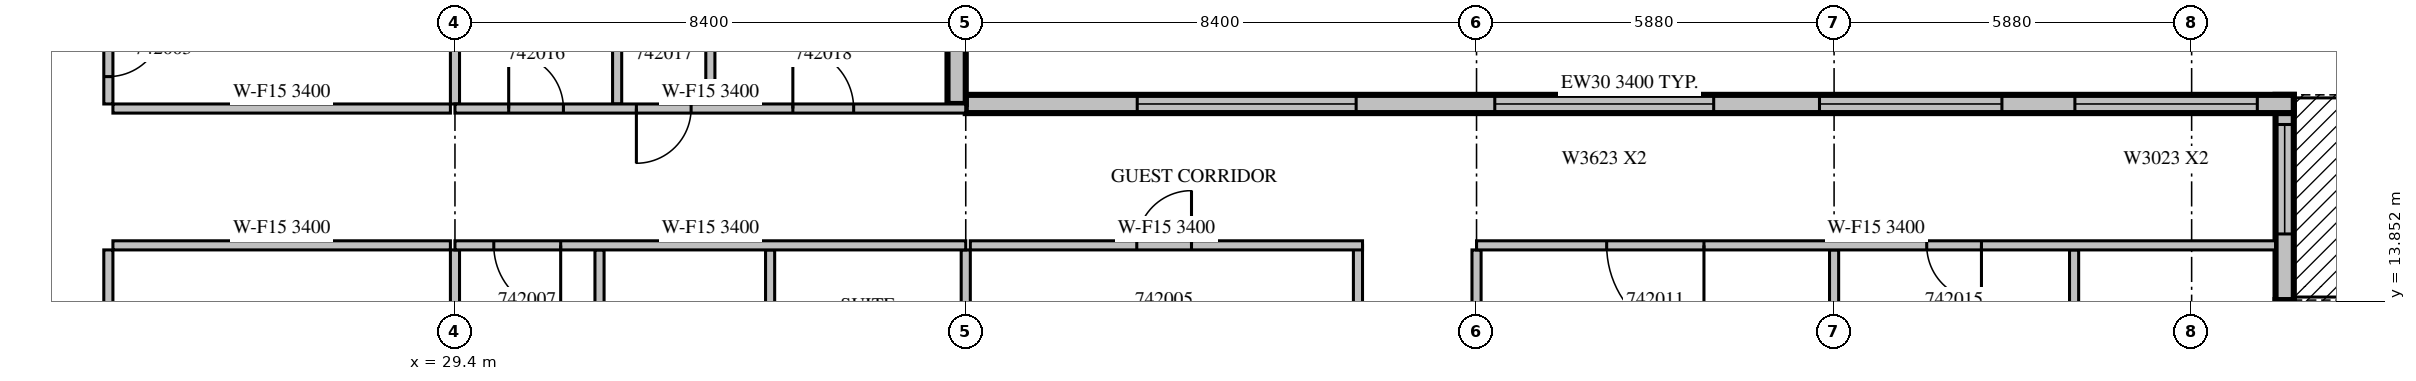
"""IFC4 building model, lengths in metres.
Left out: names, types, materials, properties, quantities, classifications, styles, units other than length and angle.
Written with IfcOpenShell. Run it as: python <this file> out.ifc"""

import sys

from ifc_helpers import new_model, si_unit, direction, frame, frame_2d, origin, place, context, subcontext, project, spatial, rectangle, extrude, source, transform, mapped, element, fill, save


model = new_model("IFC4")
c1 = context("Model", 3, precision=1e-05, world=origin(), true_north=direction((0.0, 1.0)))
c2 = subcontext(c1, "Body", "Model", "MODEL_VIEW")
j1 = project(units=[si_unit("LENGTHUNIT", "METRE"), si_unit("PLANEANGLEUNIT", "RADIAN")], contexts=[c1])
p1 = place(None, origin())
s1 = spatial("IfcSite", under=j1, at=p1, CompositionType="ELEMENT")
p2 = place(p1, origin())
s2 = spatial("IfcBuilding", under=s1, at=p2, CompositionType="ELEMENT")
p3 = place(p2, frame((0.0, 0.0, 193.0)))
s3 = spatial("IfcBuildingStorey", under=s2, at=p3, CompositionType="ELEMENT", Elevation=193.0)
m1 = source(origin(), c2, "Body", "SweptSolid", [
    extrude(rectangle(XDim=3.375, YDim=0.3, at=frame_2d((1.688, 0.0))), origin(), (0.0, 0.0, 1.0), 3.4),
])
p4 = place(p3, frame((59.49, 10.5, 0.0), z_axis=(0.0, 0.0, 1.0), x_axis=(0.0, 1.0, 0.0)))
e1 = element("IfcWall", 1, at=p4, inside=s3, PredefinedType="STANDARD", context=c2, shape_type="MappedRepresentation", body=[
    mapped(m1, transform((0.0, 0.0, 0.0), scale=1.0)),
])
m2 = source(origin(), c2, "Body", "SweptSolid", [
    extrude(rectangle(XDim=1.2, YDim=2.3, at=frame_2d((0.6, 1.15))), frame((0.0, 0.16, 0.0), z_axis=(0.0, -1.0, 0.0), x_axis=(1.0, 0.0, 0.0)), (0.0, 0.0, 1.0), 0.32),
])
p5 = place(p4, frame((1.087, 0.0, 0.6)))
e2 = element("IfcOpeningElement", 2, at=p5, cuts=e1, PredefinedType="OPENING", context=c2, shape_type="MappedRepresentation", body=[
    mapped(m2, transform((0.0, 0.0, 0.0), scale=1.0)),
])
p6 = place(p3, frame((59.49, 13.875, 0.0), z_axis=(0.0, 0.0, 1.0), x_axis=(0.0, 1.0, 0.0)))
e3 = element("IfcWall", 3, at=p6, inside=s3, PredefinedType="STANDARD", context=c2, shape_type="MappedRepresentation", body=[
    mapped(m1, transform((0.0, 0.0, 0.0), scale=1.0)),
])
m3 = source(origin(), c2, "Body", "SweptSolid", [
    extrude(rectangle(XDim=1.8, YDim=2.4, at=frame_2d((0.9, 1.2))), frame((0.0, 0.16, 0.0), z_axis=(0.0, -1.0, 0.0), x_axis=(1.0, 0.0, 0.0)), (0.0, 0.0, 1.0), 0.32),
])
p7 = place(p6, frame((1.087, 0.0, 0.0)))
e4 = element("IfcOpeningElement", 4, at=p7, cuts=e3, PredefinedType="OPENING", context=c2, shape_type="MappedRepresentation", body=[
    mapped(m3, transform((0.0, 0.0, 0.0), scale=1.0)),
])
m4 = source(origin(), c2, "Body", "SweptSolid", [
    extrude(rectangle(XDim=21.84, YDim=0.3, at=frame_2d((10.92, 0.0))), origin(), (0.0, 0.0, 1.0), 3.4),
])
p8 = place(p3, frame((59.64, 17.1, 0.0), z_axis=(0.0, 0.0, 1.0), x_axis=(-1.0, 0.0, 0.0)))
e5 = element("IfcWall", 5, at=p8, inside=s3, PredefinedType="STANDARD", context=c2, shape_type="MappedRepresentation", body=[
    mapped(m4, transform((0.0, 0.0, 0.0), scale=1.0)),
])
m5 = source(origin(), c2, "Body", "SweptSolid", [
    extrude(rectangle(XDim=3.0, YDim=2.3, at=frame_2d((1.5, 1.15))), frame((0.0, 0.16, 0.0), z_axis=(0.0, -1.0, 0.0), x_axis=(1.0, 0.0, 0.0)), (0.0, 0.0, 1.0), 0.32),
])
p9 = place(p8, frame((0.6, 0.0, 0.6)))
e6 = element("IfcOpeningElement", 6, at=p9, cuts=e5, PredefinedType="OPENING", context=c2, shape_type="MappedRepresentation", body=[
    mapped(m5, transform((0.0, 0.0, 0.0), scale=1.0)),
])
p10 = place(p8, frame((4.8, 0.0, 0.6)))
e7 = element("IfcOpeningElement", 7, at=p10, cuts=e5, PredefinedType="OPENING", context=c2, shape_type="MappedRepresentation", body=[
    mapped(m5, transform((0.0, 0.0, 0.0), scale=1.0)),
])
m6 = source(origin(), c2, "Body", "SweptSolid", [
    extrude(rectangle(XDim=3.6, YDim=2.3, at=frame_2d((1.8, 1.15))), frame((0.0, 0.16, 0.0), z_axis=(0.0, -1.0, 0.0), x_axis=(1.0, 0.0, 0.0)), (0.0, 0.0, 1.0), 0.32),
])
p11 = place(p8, frame((9.54, 0.0, 0.6)))
e8 = element("IfcOpeningElement", 8, at=p11, cuts=e5, PredefinedType="OPENING", context=c2, shape_type="MappedRepresentation", body=[
    mapped(m6, transform((0.0, 0.0, 0.0), scale=1.0)),
])
p12 = place(p8, frame((15.42, 0.0, 0.6)))
e9 = element("IfcOpeningElement", 9, at=p12, cuts=e5, PredefinedType="OPENING", context=c2, shape_type="MappedRepresentation", body=[
    mapped(m6, transform((0.0, 0.0, 0.0), scale=1.0)),
])
m7 = source(origin(), c2, "Body", "SweptSolid", [
    extrude(rectangle(XDim=3.0, YDim=0.3, at=frame_2d((1.5, 0.0))), origin(), (0.0, 0.0, 1.0), 3.4),
])
p13 = place(p3, frame((37.65, 17.1, 0.0), z_axis=(0.0, 0.0, 1.0), x_axis=(0.0, 1.0, 0.0)))
e10 = element("IfcWall", 10, at=p13, inside=s3, PredefinedType="STANDARD", context=c2, shape_type="MappedRepresentation", body=[
    mapped(m7, transform((0.0, 0.0, 0.0), scale=1.0)),
])
p14 = place(p13, frame((1.425, 0.0, 0.6)))
e11 = element("IfcOpeningElement", 11, at=p14, cuts=e10, PredefinedType="OPENING", context=c2, shape_type="MappedRepresentation", body=[
    mapped(m2, transform((0.0, 0.0, 0.0), scale=1.0)),
])
p15 = place(p3, frame((23.7, 14.7, 0.0), z_axis=(0.0, 0.0, 1.0), x_axis=(0.0, -1.0, 0.0)))
e12 = element("IfcWall", 12, at=p15, inside=s3, PredefinedType="PARTITIONING", context=c2, shape_type="SweptSolid", body=[
    extrude(rectangle(XDim=11.225, YDim=0.15, at=frame_2d((5.612, 0.0))), origin(), (0.0, 0.0, 1.0), 2.4),
])
m8 = source(origin(), c2, "Body", "SweptSolid", [
    extrude(rectangle(XDim=0.9, YDim=2.1, at=frame_2d((0.45, 1.05))), frame((0.0, 0.085, 0.0), z_axis=(0.0, -1.0, 0.0), x_axis=(1.0, 0.0, 0.0)), (0.0, 0.0, 1.0), 0.17),
])
p16 = place(p15, frame((8.463, 0.0, 0.0)))
e13 = element("IfcOpeningElement", 13, at=p16, cuts=e12, PredefinedType="OPENING", context=c2, shape_type="MappedRepresentation", body=[
    mapped(m8, transform((0.0, 0.0, 0.0), scale=1.0)),
])
p17 = place(p15, frame((1.975, 0.0, 0.0)))
e14 = element("IfcOpeningElement", 14, at=p17, cuts=e12, PredefinedType="OPENING", context=c2, shape_type="MappedRepresentation", body=[
    mapped(m8, transform((0.0, 0.0, 0.0), scale=1.0)),
])
m9 = source(origin(), c2, "Body", "SweptSolid", [
    extrude(rectangle(XDim=3.6, YDim=0.15, at=frame_2d((1.8, 0.0))), origin(), (0.0, 0.0, 1.0), 3.4),
])
p18 = place(p3, frame((23.7, 20.7, 0.0), z_axis=(0.0, 0.0, 1.0), x_axis=(0.0, -1.0, 0.0)))
e15 = element("IfcWall", 15, at=p18, inside=s3, PredefinedType="PARTITIONING", context=c2, shape_type="MappedRepresentation", body=[
    mapped(m9, transform((0.0, 0.0, 0.0), scale=1.0)),
])
p19 = place(p18, frame((2.25, 0.0, 0.0)))
e16 = element("IfcOpeningElement", 16, at=p19, cuts=e15, PredefinedType="OPENING", context=c2, shape_type="MappedRepresentation", body=[
    mapped(m8, transform((0.0, 0.0, 0.0), scale=1.0)),
])
m10 = source(origin(), c2, "Body", "SweptSolid", [
    extrude(rectangle(XDim=5.55, YDim=0.15, at=frame_2d((2.775, 0.0))), origin(), (0.0, 0.0, 1.0), 3.4),
])
for number, where, z_axis, x_axis in (
    (17, (29.325, 14.775, 0.0), (0.0, 0.0, 1.0), (-1.0, 0.0, 0.0)),
    (18, (23.775, 17.025, 0.0), (0.0, 0.0, 1.0), (1.0, 0.0, 0.0)),
):
    element("IfcWall", number, at=place(p3, frame(where, z_axis=z_axis, x_axis=x_axis)), inside=s3, PredefinedType="PARTITIONING", context=c2, shape_type="MappedRepresentation", body=[
        mapped(m10, transform((0.0, 0.0, 0.0), scale=1.0)),
    ])
p20 = place(p3, frame((29.4, 10.949, 0.0), z_axis=(0.0, 0.0, 1.0), x_axis=(0.0, 1.0, 0.0)))
e19 = element("IfcWall", 19, at=p20, inside=s3, PredefinedType="PARTITIONING", context=c2, shape_type="SweptSolid", body=[
    extrude(rectangle(XDim=3.751, YDim=0.15, at=frame_2d((1.875, 0.0))), origin(), (0.0, 0.0, 1.0), 3.4),
])
m11 = source(origin(), c2, "Body", "SweptSolid", [
    extrude(rectangle(XDim=3.001, YDim=0.15, at=frame_2d((1.5, 0.0))), origin(), (0.0, 0.0, 1.0), 3.4),
])
p21 = place(p3, frame((29.4, 17.1, 0.0), z_axis=(0.0, 0.0, 1.0), x_axis=(0.0, 1.0, 0.0)))
e20 = element("IfcWall", 20, at=p21, inside=s3, PredefinedType="PARTITIONING", context=c2, shape_type="MappedRepresentation", body=[
    mapped(m11, transform((0.0, 0.0, 0.0), scale=1.0)),
])
p22 = place(p3, frame((44.25, 11.9, 0.0), z_axis=(0.0, 0.0, 1.0), x_axis=(0.0, 1.0, 0.0)))
e21 = element("IfcWall", 21, at=p22, inside=s3, PredefinedType="PARTITIONING", context=c2, shape_type="SweptSolid", body=[
    extrude(rectangle(XDim=2.875, YDim=0.15, at=frame_2d((1.438, 0.0))), origin(), (0.0, 0.0, 1.0), 3.4),
])
m12 = source(origin(), c2, "Body", "SweptSolid", [
    extrude(rectangle(XDim=6.45, YDim=0.15, at=frame_2d((3.225, 0.0))), origin(), (0.0, 0.0, 1.0), 3.4),
])
p23 = place(p3, frame((44.325, 14.775, 0.0), z_axis=(0.0, 0.0, 1.0), x_axis=(-1.0, 0.0, 0.0)))
e22 = element("IfcWall", 22, at=p23, inside=s3, PredefinedType="PARTITIONING", context=c2, shape_type="MappedRepresentation", body=[
    mapped(m12, transform((0.0, 0.0, 0.0), scale=1.0)),
])
p24 = place(p23, frame((2.812, 0.0, 0.0)))
e23 = element("IfcOpeningElement", 23, at=p24, cuts=e22, PredefinedType="OPENING", context=c2, shape_type="MappedRepresentation", body=[
    mapped(m8, transform((0.0, 0.0, 0.0), scale=1.0)),
])
for number, where, z_axis, x_axis in (
    (24, (31.777, 11.1, 0.0), (0.0, 0.0, 1.0), (0.0, 1.0, 0.0)),
    (25, (34.583, 11.1, 0.0), (0.0, 0.0, 1.0), (0.0, 1.0, 0.0)),
    (26, (37.8, 11.1, 0.0), (0.0, 0.0, 1.0), (0.0, 1.0, 0.0)),
    (27, (52.08, 11.1, 0.0), (0.0, 0.0, 1.0), (0.0, 1.0, 0.0)),
    (28, (56.027, 11.1, 0.0), (0.0, 0.0, 1.0), (0.0, 1.0, 0.0)),
    (29, (46.2, 11.1, 0.0), (0.0, 0.0, 1.0), (0.0, 1.0, 0.0)),
    (30, (32.067, 20.7, 0.0), (0.0, 0.0, 1.0), (0.0, -1.0, 0.0)),
    (31, (33.6, 17.1, 0.0), (0.0, 0.0, 1.0), (0.0, 1.0, 0.0)),
):
    element("IfcWall", number, at=place(p3, frame(where, z_axis=z_axis, x_axis=x_axis)), inside=s3, PredefinedType="PARTITIONING", context=c2, shape_type="MappedRepresentation", body=[
        mapped(m9, transform((0.0, 0.0, 0.0), scale=1.0)),
    ])
m13 = source(origin(), c2, "Body", "SweptSolid", [
    extrude(rectangle(XDim=8.4, YDim=0.15, at=frame_2d((4.2, 0.0))), origin(), (0.0, 0.0, 1.0), 3.4),
])
p25 = place(p3, frame((37.8, 14.775, 0.0), z_axis=(0.0, 0.0, 1.0), x_axis=(-1.0, 0.0, 0.0)))
e32 = element("IfcWall", 32, at=p25, inside=s3, PredefinedType="PARTITIONING", context=c2, shape_type="MappedRepresentation", body=[
    mapped(m13, transform((0.0, 0.0, 0.0), scale=1.0)),
])
m14 = source(origin(), c2, "Body", "SweptSolid", [
    extrude(rectangle(XDim=1.1, YDim=2.1, at=frame_2d((0.55, 1.05))), frame((0.0, 0.085, 0.0), z_axis=(0.0, -1.0, 0.0), x_axis=(1.0, 0.0, 0.0)), (0.0, 0.0, 1.0), 0.17),
])
p26 = place(p25, frame((6.662, 0.0, 0.0)))
e33 = element("IfcOpeningElement", 33, at=p26, cuts=e32, PredefinedType="OPENING", context=c2, shape_type="MappedRepresentation", body=[
    mapped(m14, transform((0.0, 0.0, 0.0), scale=1.0)),
])
m15 = source(origin(), c2, "Body", "SweptSolid", [
    extrude(rectangle(XDim=13.14, YDim=0.15, at=frame_2d((6.57, 0.0))), origin(), (0.0, 0.0, 1.0), 3.4),
])
p27 = place(p3, frame((59.34, 14.775, 0.0), z_axis=(0.0, 0.0, 1.0), x_axis=(-1.0, 0.0, 0.0)))
e34 = element("IfcWall", 34, at=p27, inside=s3, PredefinedType="PARTITIONING", context=c2, shape_type="MappedRepresentation", body=[
    mapped(m15, transform((0.0, 0.0, 0.0), scale=1.0)),
])
m16 = source(origin(), c2, "Body", "SweptSolid", [
    extrude(rectangle(XDim=1.6, YDim=2.1, at=frame_2d((0.8, 1.05))), frame((0.0, 0.085, 0.0), z_axis=(0.0, -1.0, 0.0), x_axis=(1.0, 0.0, 0.0)), (0.0, 0.0, 1.0), 0.17),
])
p28 = place(p27, frame((9.4, 0.0, 0.0)))
e35 = element("IfcOpeningElement", 35, at=p28, cuts=e34, PredefinedType="OPENING", context=c2, shape_type="MappedRepresentation", body=[
    mapped(m16, transform((0.0, 0.0, 0.0), scale=1.0)),
])
p29 = place(p27, frame((4.837, 0.0, 0.0)))
e36 = element("IfcOpeningElement", 36, at=p29, cuts=e34, PredefinedType="OPENING", context=c2, shape_type="MappedRepresentation", body=[
    mapped(m8, transform((0.0, 0.0, 0.0), scale=1.0)),
])
p30 = place(p3, frame((29.4, 17.025, 0.0), z_axis=(0.0, 0.0, 1.0), x_axis=(1.0, 0.0, 0.0)))
e37 = element("IfcWall", 37, at=p30, inside=s3, PredefinedType="PARTITIONING", context=c2, shape_type="MappedRepresentation", body=[
    mapped(m13, transform((0.0, 0.0, 0.0), scale=1.0)),
])
p31 = place(p30, frame((0.883, 0.0, 0.0)))
e38 = element("IfcOpeningElement", 38, at=p31, cuts=e37, PredefinedType="OPENING", context=c2, shape_type="MappedRepresentation", body=[
    mapped(m8, transform((0.0, 0.0, 0.0), scale=1.0)),
])
p32 = place(p30, frame((2.983, 0.0, 0.0)))
e39 = element("IfcOpeningElement", 39, at=p32, cuts=e37, PredefinedType="OPENING", context=c2, shape_type="MappedRepresentation", body=[
    mapped(m8, transform((0.0, 0.0, 0.0), scale=1.0)),
])
m17 = source(origin(), c2, "Body", "SweptSolid", [
    extrude(rectangle(XDim=1.0, YDim=2.1, at=frame_2d((0.5, 1.05))), frame((0.0, 0.085, 0.0), z_axis=(0.0, -1.0, 0.0), x_axis=(1.0, 0.0, 0.0)), (0.0, 0.0, 1.0), 0.17),
])
p33 = place(p30, frame((5.557, 0.0, 0.0)))
e40 = element("IfcOpeningElement", 40, at=p33, cuts=e37, PredefinedType="OPENING", context=c2, shape_type="MappedRepresentation", body=[
    mapped(m17, transform((0.0, 0.0, 0.0), scale=1.0)),
])
m18 = source(origin(), c2, "Body", "SweptSolid", [
    extrude(rectangle(XDim=1.8, YDim=2.4, at=frame_2d((0.9, 1.2))), frame((0.0, 0.025, 0.0), z_axis=(0.0, -1.0, 0.0), x_axis=(1.0, 0.0, 0.0)), (0.0, 0.0, 1.0), 0.05),
])
p34 = place(p7, origin())
e41 = element("IfcDoor", 41, at=p34, inside=s3, OperationType="SLIDING_TO_LEFT", PredefinedType="DOOR", context=c2, shape_type="MappedRepresentation", body=[
    mapped(m18, transform((0.0, 0.0, 0.0), scale=1.0)),
])
fill(e4, e41)
m19 = source(origin(), c2, "Body", "SweptSolid", [
    extrude(rectangle(XDim=3.0, YDim=2.3, at=frame_2d((1.5, 1.15))), frame((0.0, 0.03, 0.0), z_axis=(0.0, -1.0, 0.0), x_axis=(1.0, 0.0, 0.0)), (0.0, 0.0, 1.0), 0.06),
])
p35 = place(p9, origin())
e42 = element("IfcWindow", 42, at=p35, inside=s3, PartitioningType="SINGLE_PANEL", PredefinedType="WINDOW", context=c2, shape_type="MappedRepresentation", body=[
    mapped(m19, transform((0.0, 0.0, 0.0), scale=1.0)),
])
fill(e6, e42)
p36 = place(p10, origin())
e43 = element("IfcWindow", 43, at=p36, inside=s3, PartitioningType="SINGLE_PANEL", PredefinedType="WINDOW", context=c2, shape_type="MappedRepresentation", body=[
    mapped(m19, transform((0.0, 0.0, 0.0), scale=1.0)),
])
fill(e7, e43)
m20 = source(origin(), c2, "Body", "SweptSolid", [
    extrude(rectangle(XDim=3.6, YDim=2.3, at=frame_2d((1.8, 1.15))), frame((0.0, 0.03, 0.0), z_axis=(0.0, -1.0, 0.0), x_axis=(1.0, 0.0, 0.0)), (0.0, 0.0, 1.0), 0.06),
])
p37 = place(p11, origin())
e44 = element("IfcWindow", 44, at=p37, inside=s3, PartitioningType="SINGLE_PANEL", PredefinedType="WINDOW", context=c2, shape_type="MappedRepresentation", body=[
    mapped(m20, transform((0.0, 0.0, 0.0), scale=1.0)),
])
fill(e8, e44)
p38 = place(p12, origin())
e45 = element("IfcWindow", 45, at=p38, inside=s3, PartitioningType="SINGLE_PANEL", PredefinedType="WINDOW", context=c2, shape_type="MappedRepresentation", body=[
    mapped(m20, transform((0.0, 0.0, 0.0), scale=1.0)),
])
fill(e9, e45)
m21 = source(origin(), c2, "Body", "SweptSolid", [
    extrude(rectangle(XDim=0.9, YDim=2.1, at=frame_2d((0.45, 1.05))), frame((0.0, 0.025, 0.0), z_axis=(0.0, -1.0, 0.0), x_axis=(1.0, 0.0, 0.0)), (0.0, 0.0, 1.0), 0.05),
])
p39 = place(p19, origin())
e46 = element("IfcDoor", 46, at=p39, inside=s3, OperationType="SINGLE_SWING_LEFT", PredefinedType="DOOR", context=c2, shape_type="MappedRepresentation", body=[
    mapped(m21, transform((0.0, 0.0, 0.0), scale=1.0)),
])
fill(e16, e46)
p40 = place(p24, origin())
e47 = element("IfcDoor", 47, at=p40, inside=s3, OperationType="SINGLE_SWING_RIGHT", PredefinedType="DOOR", context=c2, shape_type="MappedRepresentation", body=[
    mapped(m21, transform((0.0, 0.0, 0.0), scale=1.0)),
])
fill(e23, e47)
m22 = source(origin(), c2, "Body", "SweptSolid", [
    extrude(rectangle(XDim=1.1, YDim=2.1, at=frame_2d((0.55, 1.05))), frame((0.0, 0.025, 0.0), z_axis=(0.0, -1.0, 0.0), x_axis=(1.0, 0.0, 0.0)), (0.0, 0.0, 1.0), 0.05),
])
p41 = place(p26, origin())
e48 = element("IfcDoor", 48, at=p41, inside=s3, OperationType="SINGLE_SWING_LEFT", PredefinedType="DOOR", context=c2, shape_type="MappedRepresentation", body=[
    mapped(m22, transform((0.0, 0.0, 0.0), scale=1.0)),
])
fill(e33, e48)
m23 = source(origin(), c2, "Body", "SweptSolid", [
    extrude(rectangle(XDim=1.6, YDim=2.1, at=frame_2d((0.8, 1.05))), frame((0.0, 0.025, 0.0), z_axis=(0.0, -1.0, 0.0), x_axis=(1.0, 0.0, 0.0)), (0.0, 0.0, 1.0), 0.05),
])
p42 = place(p28, origin())
e49 = element("IfcDoor", 49, at=p42, inside=s3, OperationType="SINGLE_SWING_LEFT", PredefinedType="DOOR", context=c2, shape_type="MappedRepresentation", body=[
    mapped(m23, transform((0.0, 0.0, 0.0), scale=1.0)),
])
fill(e35, e49)
p43 = place(p29, origin())
e50 = element("IfcDoor", 50, at=p43, inside=s3, OperationType="SINGLE_SWING_LEFT", PredefinedType="DOOR", context=c2, shape_type="MappedRepresentation", body=[
    mapped(m21, transform((0.0, 0.0, 0.0), scale=1.0)),
])
fill(e36, e50)
p44 = place(p31, origin())
e51 = element("IfcDoor", 51, at=p44, inside=s3, OperationType="SINGLE_SWING_LEFT", PredefinedType="DOOR", context=c2, shape_type="MappedRepresentation", body=[
    mapped(m21, transform((0.0, 0.0, 0.0), scale=1.0)),
])
fill(e38, e51)
p45 = place(p32, origin())
e52 = element("IfcDoor", 52, at=p45, inside=s3, OperationType="SINGLE_SWING_RIGHT", PredefinedType="DOOR", context=c2, shape_type="MappedRepresentation", body=[
    mapped(m21, transform((0.0, 0.0, 0.0), scale=1.0)),
])
fill(e39, e52)
m24 = source(origin(), c2, "Body", "SweptSolid", [
    extrude(rectangle(XDim=1.0, YDim=2.1, at=frame_2d((0.5, 1.05))), frame((0.0, 0.025, 0.0), z_axis=(0.0, -1.0, 0.0), x_axis=(1.0, 0.0, 0.0)), (0.0, 0.0, 1.0), 0.05),
])
p46 = place(p33, origin())
e53 = element("IfcDoor", 53, at=p46, inside=s3, OperationType="SINGLE_SWING_LEFT", PredefinedType="DOOR", context=c2, shape_type="MappedRepresentation", body=[
    mapped(m24, transform((0.0, 0.0, 0.0), scale=1.0)),
])
fill(e40, e53)
save(model, sys.argv[1])
